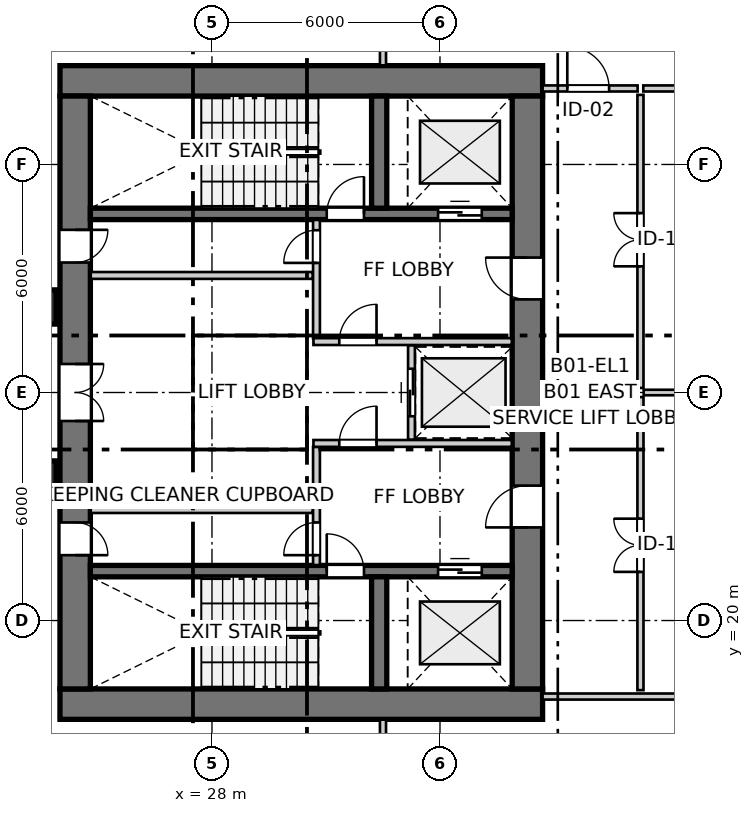
"""IFC4 building model, lengths in metres.
Left out: names, types, materials, properties, quantities, classifications, styles, units other than length and angle.
Written with IfcOpenShell. Run it as: python <this file> out.ifc"""

import sys

from ifc_helpers import new_model, si_unit, direction, frame, frame_2d, origin, origin_2d, place, context, subcontext, project, spatial, rectangle, extrude, source, transform, mapped, element, fill, save


model = new_model("IFC4")
c1 = context("Model", 3, precision=1e-05, world=origin(), true_north=direction((0.0, 1.0)))
c2 = subcontext(c1, "Body", "Model", "MODEL_VIEW")
j1 = project(units=[si_unit("LENGTHUNIT", "METRE"), si_unit("PLANEANGLEUNIT", "RADIAN")], contexts=[c1])
p1 = place(None, origin())
s1 = spatial("IfcSite", under=j1, at=p1, CompositionType="ELEMENT")
p2 = place(p1, origin())
s2 = spatial("IfcBuilding", under=s1, at=p2, CompositionType="ELEMENT")
p3 = place(p2, frame((0.0, 0.0, -4.2)))
s3 = spatial("IfcBuildingStorey", under=s2, at=p3, CompositionType="ELEMENT", Elevation=-4.2)
m1 = source(origin(), c2, "Body", "SweptSolid", [
    extrude(rectangle(XDim=0.9, YDim=0.9, at=origin_2d()), origin(), (0.0, 0.0, 1.0), 3.9),
])
for number, where, z_axis, x_axis in (
    (1, (23.45, 23.75, 0.0), (0.0, 0.0, 1.0), (1.0, 0.0, 0.0)),
    (2, (23.45, 28.25, 0.0), (0.0, 0.0, 1.0), (1.0, 0.0, 0.0)),
):
    element("IfcColumn", number, at=place(p3, frame(where, z_axis=z_axis, x_axis=x_axis)), inside=s3, PredefinedType="COLUMN", context=c2, shape_type="MappedRepresentation", body=[
        mapped(m1, transform((0.0, 0.0, 0.0), x_axis=(1.0, 0.0, 0.0), y_axis=(0.0, 1.0, 0.0), z_axis=(0.0, 0.0, 1.0), scale=1.0)),
    ])
for number, where, z_axis, x_axis in (
    (3, (24.0, 17.8, 0.0), (0.0, 0.0, 1.0), (1.0, 0.0, 0.0)),
    (4, (36.7, 34.2, 0.0), (0.0, 0.0, 1.0), (-1.0, 0.0, 0.0)),
):
    element("IfcWall", number, at=place(p3, frame(where, z_axis=z_axis, x_axis=x_axis)), inside=s3, PredefinedType="SHEAR", context=c2, shape_type="SweptSolid", body=[
        extrude(rectangle(XDim=12.7, YDim=0.8, at=frame_2d((6.35, 0.0))), origin(), (0.0, 0.0, 1.0), 3.9),
    ])
p4 = place(p3, frame((24.4, 33.8, 0.0), z_axis=(0.0, 0.0, 1.0), x_axis=(0.0, -1.0, 0.0)))
e5 = element("IfcWall", 5, at=p4, inside=s3, PredefinedType="SHEAR", context=c2, shape_type="SweptSolid", body=[
    extrude(rectangle(XDim=15.6, YDim=0.8, at=frame_2d((7.8, 0.0))), origin(), (0.0, 0.0, 1.0), 3.9),
])
p5 = place(p4, frame((7.05, 0.0, 0.0)))
e6 = element("IfcOpeningElement", 6, at=p5, cuts=e5, PredefinedType="OPENING", context=c2, shape_type="SweptSolid", body=[
    extrude(rectangle(XDim=1.5, YDim=2.15, at=frame_2d((0.75, 1.075))), frame((0.0, 0.41, 0.0), z_axis=(0.0, -1.0, 0.0), x_axis=(1.0, 0.0, 0.0)), (0.0, 0.0, 1.0), 0.82),
])
p6 = place(p4, frame((3.52, 0.0, 0.0)))
e7 = element("IfcOpeningElement", 7, at=p6, cuts=e5, PredefinedType="OPENING", context=c2, shape_type="SweptSolid", body=[
    extrude(rectangle(XDim=0.86, YDim=2.05, at=frame_2d((0.43, 1.025))), frame((0.0, 0.41, 0.0), z_axis=(0.0, -1.0, 0.0), x_axis=(1.0, 0.0, 0.0)), (0.0, 0.0, 1.0), 0.82),
])
p7 = place(p4, frame((11.22, 0.0, 0.0)))
e8 = element("IfcOpeningElement", 8, at=p7, cuts=e5, PredefinedType="OPENING", context=c2, shape_type="SweptSolid", body=[
    extrude(rectangle(XDim=0.86, YDim=2.05, at=frame_2d((0.43, 1.025))), frame((0.0, 0.41, 0.0), z_axis=(0.0, -1.0, 0.0), x_axis=(1.0, 0.0, 0.0)), (0.0, 0.0, 1.0), 0.82),
])
p8 = place(p3, frame((36.3, 18.2, 0.0), z_axis=(0.0, 0.0, 1.0), x_axis=(0.0, 1.0, 0.0)))
e9 = element("IfcWall", 9, at=p8, inside=s3, PredefinedType="SHEAR", context=c2, shape_type="SweptSolid", body=[
    extrude(rectangle(XDim=15.6, YDim=0.8, at=frame_2d((7.8, 0.0))), origin(), (0.0, 0.0, 1.0), 3.9),
])
p9 = place(p8, frame((4.25, 0.0, 0.0)))
e10 = element("IfcOpeningElement", 10, at=p9, cuts=e9, PredefinedType="OPENING", context=c2, shape_type="SweptSolid", body=[
    extrude(rectangle(XDim=1.1, YDim=2.15, at=frame_2d((0.55, 1.075))), frame((0.0, 0.41, 0.0), z_axis=(0.0, -1.0, 0.0), x_axis=(1.0, 0.0, 0.0)), (0.0, 0.0, 1.0), 0.82),
])
p10 = place(p8, frame((10.25, 0.0, 0.0)))
e11 = element("IfcOpeningElement", 11, at=p10, cuts=e9, PredefinedType="OPENING", context=c2, shape_type="SweptSolid", body=[
    extrude(rectangle(XDim=1.1, YDim=2.15, at=frame_2d((0.55, 1.075))), frame((0.0, 0.41, 0.0), z_axis=(0.0, -1.0, 0.0), x_axis=(1.0, 0.0, 0.0)), (0.0, 0.0, 1.0), 0.82),
])
p11 = place(p3, frame((24.8, 21.3, 0.0), z_axis=(0.0, 0.0, 1.0), x_axis=(1.0, 0.0, 0.0)))
e12 = element("IfcWall", 12, at=p11, inside=s3, PredefinedType="SHEAR", context=c2, shape_type="SweptSolid", body=[
    extrude(rectangle(XDim=11.1, YDim=0.3, at=frame_2d((5.55, 0.0))), origin(), (0.0, 0.0, 1.0), 3.9),
])
p12 = place(p11, frame((6.22, 0.0, 0.0)))
e13 = element("IfcOpeningElement", 13, at=p12, cuts=e12, PredefinedType="OPENING", context=c2, shape_type="SweptSolid", body=[
    extrude(rectangle(XDim=0.98, YDim=2.15, at=frame_2d((0.49, 1.075))), frame((0.0, 0.16, 0.0), z_axis=(0.0, -1.0, 0.0), x_axis=(1.0, 0.0, 0.0)), (0.0, 0.0, 1.0), 0.32),
])
p13 = place(p11, frame((9.15, 0.0, 0.0)))
e14 = element("IfcOpeningElement", 14, at=p13, cuts=e12, PredefinedType="OPENING", context=c2, shape_type="SweptSolid", body=[
    extrude(rectangle(XDim=1.15, YDim=2.15, at=frame_2d((0.575, 1.075))), frame((0.0, 0.16, 0.0), z_axis=(0.0, -1.0, 0.0), x_axis=(1.0, 0.0, 0.0)), (0.0, 0.0, 1.0), 0.32),
])
p14 = place(p3, frame((32.4, 18.2, 0.0), z_axis=(0.0, 0.0, 1.0), x_axis=(0.0, 1.0, 0.0)))
e15 = element("IfcWall", 15, at=p14, inside=s3, PredefinedType="SHEAR", context=c2, shape_type="SweptSolid", body=[
    extrude(rectangle(XDim=2.95, YDim=0.4, at=frame_2d((1.475, 0.0))), origin(), (0.0, 0.0, 1.0), 3.9),
])
p15 = place(p3, frame((24.8, 30.7, 0.0), z_axis=(0.0, 0.0, 1.0), x_axis=(1.0, 0.0, 0.0)))
e16 = element("IfcWall", 16, at=p15, inside=s3, PredefinedType="SHEAR", context=c2, shape_type="SweptSolid", body=[
    extrude(rectangle(XDim=11.1, YDim=0.3, at=frame_2d((5.55, 0.0))), origin(), (0.0, 0.0, 1.0), 3.9),
])
p16 = place(p15, frame((6.22, 0.0, 0.0)))
e17 = element("IfcOpeningElement", 17, at=p16, cuts=e16, PredefinedType="OPENING", context=c2, shape_type="SweptSolid", body=[
    extrude(rectangle(XDim=0.98, YDim=2.15, at=frame_2d((0.49, 1.075))), frame((0.0, 0.16, 0.0), z_axis=(0.0, -1.0, 0.0), x_axis=(1.0, 0.0, 0.0)), (0.0, 0.0, 1.0), 0.32),
])
p17 = place(p15, frame((9.15, 0.0, 0.0)))
e18 = element("IfcOpeningElement", 18, at=p17, cuts=e16, PredefinedType="OPENING", context=c2, shape_type="SweptSolid", body=[
    extrude(rectangle(XDim=1.15, YDim=2.15, at=frame_2d((0.575, 1.075))), frame((0.0, 0.16, 0.0), z_axis=(0.0, -1.0, 0.0), x_axis=(1.0, 0.0, 0.0)), (0.0, 0.0, 1.0), 0.32),
])
p18 = place(p3, frame((32.4, 30.85, 0.0), z_axis=(0.0, 0.0, 1.0), x_axis=(0.0, 1.0, 0.0)))
e19 = element("IfcWall", 19, at=p18, inside=s3, PredefinedType="SHEAR", context=c2, shape_type="SweptSolid", body=[
    extrude(rectangle(XDim=2.95, YDim=0.4, at=frame_2d((1.475, 0.0))), origin(), (0.0, 0.0, 1.0), 3.9),
])
p19 = place(p3, frame((30.75, 21.46, 0.0), z_axis=(0.0, 0.0, 1.0), x_axis=(0.0, 1.0, 0.0)))
e20 = element("IfcWall", 20, at=p19, inside=s3, PredefinedType="PARTITIONING", context=c2, shape_type="SweptSolid", body=[
    extrude(rectangle(XDim=3.11, YDim=0.18, at=frame_2d((1.555, 0.0))), origin(), (0.0, 0.0, 1.0), 3.9),
])
p20 = place(p19, frame((0.26, 0.0, 0.0)))
e21 = element("IfcOpeningElement", 21, at=p20, cuts=e20, PredefinedType="OPENING", context=c2, shape_type="SweptSolid", body=[
    extrude(rectangle(XDim=0.86, YDim=2.05, at=frame_2d((0.43, 1.025))), frame((0.0, 0.1, 0.0), z_axis=(0.0, -1.0, 0.0), x_axis=(1.0, 0.0, 0.0)), (0.0, 0.0, 1.0), 0.2),
])
p21 = place(p3, frame((30.67, 24.66, 0.0), z_axis=(0.0, 0.0, 1.0), x_axis=(1.0, 0.0, 0.0)))
e22 = element("IfcWall", 22, at=p21, inside=s3, PredefinedType="PARTITIONING", context=c2, shape_type="SweptSolid", body=[
    extrude(rectangle(XDim=5.22, YDim=0.18, at=frame_2d((2.61, 0.0))), origin(), (0.0, 0.0, 1.0), 3.9),
])
p22 = place(p21, frame((0.68, 0.0, 0.0)))
e23 = element("IfcOpeningElement", 23, at=p22, cuts=e22, PredefinedType="OPENING", context=c2, shape_type="SweptSolid", body=[
    extrude(rectangle(XDim=0.98, YDim=2.15, at=frame_2d((0.49, 1.075))), frame((0.0, 0.1, 0.0), z_axis=(0.0, -1.0, 0.0), x_axis=(1.0, 0.0, 0.0)), (0.0, 0.0, 1.0), 0.2),
])
p23 = place(p3, frame((30.75, 27.43, 0.0), z_axis=(0.0, 0.0, 1.0), x_axis=(0.0, 1.0, 0.0)))
e24 = element("IfcWall", 24, at=p23, inside=s3, PredefinedType="PARTITIONING", context=c2, shape_type="SweptSolid", body=[
    extrude(rectangle(XDim=3.11, YDim=0.18, at=frame_2d((1.555, 0.0))), origin(), (0.0, 0.0, 1.0), 3.9),
])
p24 = place(p23, frame((1.98, 0.0, 0.0)))
e25 = element("IfcOpeningElement", 25, at=p24, cuts=e24, PredefinedType="OPENING", context=c2, shape_type="SweptSolid", body=[
    extrude(rectangle(XDim=0.86, YDim=2.05, at=frame_2d((0.43, 1.025))), frame((0.0, 0.1, 0.0), z_axis=(0.0, -1.0, 0.0), x_axis=(1.0, 0.0, 0.0)), (0.0, 0.0, 1.0), 0.2),
])
p25 = place(p3, frame((30.67, 27.34, 0.0), z_axis=(0.0, 0.0, 1.0), x_axis=(1.0, 0.0, 0.0)))
e26 = element("IfcWall", 26, at=p25, inside=s3, PredefinedType="PARTITIONING", context=c2, shape_type="SweptSolid", body=[
    extrude(rectangle(XDim=5.22, YDim=0.18, at=frame_2d((2.61, 0.0))), origin(), (0.0, 0.0, 1.0), 3.9),
])
p26 = place(p25, frame((0.68, 0.0, 0.0)))
e27 = element("IfcOpeningElement", 27, at=p26, cuts=e26, PredefinedType="OPENING", context=c2, shape_type="SweptSolid", body=[
    extrude(rectangle(XDim=0.98, YDim=2.15, at=frame_2d((0.49, 1.075))), frame((0.0, 0.1, 0.0), z_axis=(0.0, -1.0, 0.0), x_axis=(1.0, 0.0, 0.0)), (0.0, 0.0, 1.0), 0.2),
])
p27 = place(p3, frame((33.25, 24.76, 0.0), z_axis=(0.0, 0.0, 1.0), x_axis=(0.0, 1.0, 0.0)))
e28 = element("IfcWall", 28, at=p27, inside=s3, PredefinedType="PARTITIONING", context=c2, shape_type="SweptSolid", body=[
    extrude(rectangle(XDim=2.48, YDim=0.18, at=frame_2d((1.24, 0.0))), origin(), (0.0, 0.0, 1.0), 3.9),
])
p28 = place(p27, frame((0.615, 0.0, 0.0)))
e29 = element("IfcOpeningElement", 29, at=p28, cuts=e28, PredefinedType="OPENING", context=c2, shape_type="SweptSolid", body=[
    extrude(rectangle(XDim=1.25, YDim=2.15, at=frame_2d((0.625, 1.075))), frame((0.0, 0.1, 0.0), z_axis=(0.0, -1.0, 0.0), x_axis=(1.0, 0.0, 0.0)), (0.0, 0.0, 1.0), 0.2),
])
for number, where, z_axis, x_axis in (
    (30, (24.81, 22.92, 0.0), (0.0, 0.0, 1.0), (1.0, 0.0, 0.0)),
    (31, (24.81, 29.08, 0.0), (0.0, 0.0, 1.0), (1.0, 0.0, 0.0)),
):
    element("IfcWall", number, at=place(p3, frame(where, z_axis=z_axis, x_axis=x_axis)), inside=s3, PredefinedType="PARTITIONING", context=c2, shape_type="SweptSolid", body=[
        extrude(rectangle(XDim=5.84, YDim=0.18, at=frame_2d((2.92, 0.0))), origin(), (0.0, 0.0, 1.0), 3.9),
    ])
for number, where, z_axis, x_axis in (
    (32, (32.5, 15.588, 0.0), (0.0, 0.0, 1.0), (0.0, 1.0, 0.0)),
    (33, (32.5, 34.608, 0.0), (0.0, 0.0, 1.0), (0.0, 1.0, 0.0)),
):
    element("IfcWall", number, at=place(p3, frame(where, z_axis=z_axis, x_axis=x_axis)), inside=s3, PredefinedType="PARTITIONING", context=c2, shape_type="SweptSolid", body=[
        extrude(rectangle(XDim=1.804, YDim=0.16, at=frame_2d((0.902, 0.0))), origin(), (0.0, 0.0, 1.0), 3.9),
    ])
p29 = place(p3, frame((36.7, 18.0, 0.0), z_axis=(0.0, 0.0, 1.0), x_axis=(1.0, 0.0, 0.0)))
e34 = element("IfcWall", 34, at=p29, inside=s3, PredefinedType="PARTITIONING", context=c2, shape_type="SweptSolid", body=[
    extrude(rectangle(XDim=9.7, YDim=0.16, at=frame_2d((4.85, 0.0))), origin(), (0.0, 0.0, 1.0), 3.9),
])
p30 = place(p3, frame((36.7, 34.0, 0.0), z_axis=(0.0, 0.0, 1.0), x_axis=(1.0, 0.0, 0.0)))
e35 = element("IfcWall", 35, at=p30, inside=s3, PredefinedType="PARTITIONING", context=c2, shape_type="SweptSolid", body=[
    extrude(rectangle(XDim=2.5, YDim=0.16, at=frame_2d((1.25, 0.0))), origin(), (0.0, 0.0, 1.0), 3.9),
])
p31 = place(p30, frame((0.65, 0.0, 0.0)))
e36 = element("IfcOpeningElement", 36, at=p31, cuts=e35, PredefinedType="OPENING", context=c2, shape_type="SweptSolid", body=[
    extrude(rectangle(XDim=1.1, YDim=2.15, at=frame_2d((0.55, 1.075))), frame((0.0, 0.09, 0.0), z_axis=(0.0, -1.0, 0.0), x_axis=(1.0, 0.0, 0.0)), (0.0, 0.0, 1.0), 0.18),
])
p32 = place(p3, frame((39.35, 34.0, 0.0), z_axis=(0.0, 0.0, 1.0), x_axis=(1.0, 0.0, 0.0)))
e37 = element("IfcWall", 37, at=p32, inside=s3, PredefinedType="PARTITIONING", context=c2, shape_type="SweptSolid", body=[
    extrude(rectangle(XDim=7.05, YDim=0.16, at=frame_2d((3.525, 0.0))), origin(), (0.0, 0.0, 1.0), 3.9),
])
p33 = place(p3, frame((39.275, 18.168, 0.0), z_axis=(0.0, 0.0, 1.0), x_axis=(0.0, 1.0, 0.0)))
e38 = element("IfcWall", 38, at=p33, inside=s3, PredefinedType="PARTITIONING", context=c2, shape_type="SweptSolid", body=[
    extrude(rectangle(XDim=7.712, YDim=0.16, at=frame_2d((3.856, 0.0))), origin(), (0.0, 0.0, 1.0), 3.9),
])
p34 = place(p33, frame((3.112, 0.0, 0.0)))
e39 = element("IfcOpeningElement", 39, at=p34, cuts=e38, PredefinedType="OPENING", context=c2, shape_type="SweptSolid", body=[
    extrude(rectangle(XDim=1.4, YDim=2.15, at=frame_2d((0.7, 1.075))), frame((0.0, 0.09, 0.0), z_axis=(0.0, -1.0, 0.0), x_axis=(1.0, 0.0, 0.0)), (0.0, 0.0, 1.0), 0.18),
])
p35 = place(p3, frame((39.275, 26.12, 0.0), z_axis=(0.0, 0.0, 1.0), x_axis=(0.0, 1.0, 0.0)))
e40 = element("IfcWall", 40, at=p35, inside=s3, PredefinedType="PARTITIONING", context=c2, shape_type="SweptSolid", body=[
    extrude(rectangle(XDim=7.712, YDim=0.16, at=frame_2d((3.856, 0.0))), origin(), (0.0, 0.0, 1.0), 3.9),
])
p36 = place(p35, frame((3.2, 0.0, 0.0)))
e41 = element("IfcOpeningElement", 41, at=p36, cuts=e40, PredefinedType="OPENING", context=c2, shape_type="SweptSolid", body=[
    extrude(rectangle(XDim=1.4, YDim=2.15, at=frame_2d((0.7, 1.075))), frame((0.0, 0.09, 0.0), z_axis=(0.0, -1.0, 0.0), x_axis=(1.0, 0.0, 0.0)), (0.0, 0.0, 1.0), 0.18),
])
p37 = place(p3, frame((39.36, 26.0, 0.0), z_axis=(0.0, 0.0, 1.0), x_axis=(1.0, 0.0, 0.0)))
e42 = element("IfcWall", 42, at=p37, inside=s3, PredefinedType="PARTITIONING", context=c2, shape_type="SweptSolid", body=[
    extrude(rectangle(XDim=6.96, YDim=0.145, at=frame_2d((3.48, 0.0))), origin(), (0.0, 0.0, 1.0), 3.9),
])
m2 = source(origin(), c2, "Body", "SweptSolid", [
    extrude(rectangle(XDim=0.98, YDim=2.15, at=frame_2d((0.49, 1.075))), frame((0.0, 0.025, 0.0), z_axis=(0.0, -1.0, 0.0), x_axis=(1.0, 0.0, 0.0)), (0.0, 0.0, 1.0), 0.05),
])
p38 = place(p12, origin())
e43 = element("IfcDoor", 43, at=p38, inside=s3, OperationType="SINGLE_SWING_LEFT", PredefinedType="DOOR", context=c2, shape_type="MappedRepresentation", body=[
    mapped(m2, transform((0.0, 0.0, 0.0), x_axis=(1.0, 0.0, 0.0), y_axis=(0.0, 1.0, 0.0), z_axis=(0.0, 0.0, 1.0), scale=1.0)),
])
fill(e13, e43)
m3 = source(origin(), c2, "Body", "SweptSolid", [
    extrude(rectangle(XDim=1.15, YDim=2.15, at=frame_2d((0.575, 1.075))), frame((0.0, 0.025, 0.0), z_axis=(0.0, -1.0, 0.0), x_axis=(1.0, 0.0, 0.0)), (0.0, 0.0, 1.0), 0.05),
])
p39 = place(p13, origin())
e44 = element("IfcDoor", 44, at=p39, inside=s3, OperationType="DOUBLE_DOOR_SLIDING", PredefinedType="DOOR", context=c2, shape_type="MappedRepresentation", body=[
    mapped(m3, transform((0.0, 0.0, 0.0), x_axis=(1.0, 0.0, 0.0), y_axis=(0.0, 1.0, 0.0), z_axis=(0.0, 0.0, 1.0), scale=1.0)),
])
fill(e14, e44)
p40 = place(p16, origin())
e45 = element("IfcDoor", 45, at=p40, inside=s3, OperationType="SINGLE_SWING_RIGHT", PredefinedType="DOOR", context=c2, shape_type="MappedRepresentation", body=[
    mapped(m2, transform((0.0, 0.0, 0.0), x_axis=(1.0, 0.0, 0.0), y_axis=(0.0, 1.0, 0.0), z_axis=(0.0, 0.0, 1.0), scale=1.0)),
])
fill(e17, e45)
p41 = place(p17, origin())
e46 = element("IfcDoor", 46, at=p41, inside=s3, OperationType="DOUBLE_DOOR_SLIDING", PredefinedType="DOOR", context=c2, shape_type="MappedRepresentation", body=[
    mapped(m3, transform((0.0, 0.0, 0.0), x_axis=(1.0, 0.0, 0.0), y_axis=(0.0, 1.0, 0.0), z_axis=(0.0, 0.0, 1.0), scale=1.0)),
])
fill(e18, e46)
m4 = source(origin(), c2, "Body", "SweptSolid", [
    extrude(rectangle(XDim=1.1, YDim=2.15, at=frame_2d((0.55, 1.075))), frame((0.0, 0.025, 0.0), z_axis=(0.0, -1.0, 0.0), x_axis=(1.0, 0.0, 0.0)), (0.0, 0.0, 1.0), 0.05),
])
p42 = place(p9, origin())
e47 = element("IfcDoor", 47, at=p42, inside=s3, OperationType="SINGLE_SWING_LEFT", PredefinedType="DOOR", context=c2, shape_type="MappedRepresentation", body=[
    mapped(m4, transform((0.0, 0.0, 0.0), x_axis=(1.0, 0.0, 0.0), y_axis=(0.0, 1.0, 0.0), z_axis=(0.0, 0.0, 1.0), scale=1.0)),
])
fill(e10, e47)
p43 = place(p10, origin())
e48 = element("IfcDoor", 48, at=p43, inside=s3, OperationType="SINGLE_SWING_RIGHT", PredefinedType="DOOR", context=c2, shape_type="MappedRepresentation", body=[
    mapped(m4, transform((0.0, 0.0, 0.0), x_axis=(1.0, 0.0, 0.0), y_axis=(0.0, 1.0, 0.0), z_axis=(0.0, 0.0, 1.0), scale=1.0)),
])
fill(e11, e48)
m5 = source(origin(), c2, "Body", "SweptSolid", [
    extrude(rectangle(XDim=1.5, YDim=2.15, at=frame_2d((0.75, 1.075))), frame((0.0, 0.025, 0.0), z_axis=(0.0, -1.0, 0.0), x_axis=(1.0, 0.0, 0.0)), (0.0, 0.0, 1.0), 0.05),
])
p44 = place(p5, origin())
e49 = element("IfcDoor", 49, at=p44, inside=s3, OperationType="DOUBLE_DOOR_SINGLE_SWING", PredefinedType="DOOR", context=c2, shape_type="MappedRepresentation", body=[
    mapped(m5, transform((0.0, 0.0, 0.0), x_axis=(1.0, 0.0, 0.0), y_axis=(0.0, 1.0, 0.0), z_axis=(0.0, 0.0, 1.0), scale=1.0)),
])
fill(e6, e49)
m6 = source(origin(), c2, "Body", "SweptSolid", [
    extrude(rectangle(XDim=0.86, YDim=2.05, at=frame_2d((0.43, 1.025))), frame((0.0, 0.025, 0.0), z_axis=(0.0, -1.0, 0.0), x_axis=(1.0, 0.0, 0.0)), (0.0, 0.0, 1.0), 0.05),
])
p45 = place(p6, origin())
e50 = element("IfcDoor", 50, at=p45, inside=s3, OperationType="SINGLE_SWING_LEFT", PredefinedType="DOOR", context=c2, shape_type="MappedRepresentation", body=[
    mapped(m6, transform((0.0, 0.0, 0.0), x_axis=(1.0, 0.0, 0.0), y_axis=(0.0, 1.0, 0.0), z_axis=(0.0, 0.0, 1.0), scale=1.0)),
])
fill(e7, e50)
p46 = place(p7, origin())
e51 = element("IfcDoor", 51, at=p46, inside=s3, OperationType="SINGLE_SWING_RIGHT", PredefinedType="DOOR", context=c2, shape_type="MappedRepresentation", body=[
    mapped(m6, transform((0.0, 0.0, 0.0), x_axis=(1.0, 0.0, 0.0), y_axis=(0.0, 1.0, 0.0), z_axis=(0.0, 0.0, 1.0), scale=1.0)),
])
fill(e8, e51)
p47 = place(p20, origin())
e52 = element("IfcDoor", 52, at=p47, inside=s3, OperationType="SINGLE_SWING_LEFT", PredefinedType="DOOR", context=c2, shape_type="MappedRepresentation", body=[
    mapped(m6, transform((0.0, 0.0, 0.0), x_axis=(1.0, 0.0, 0.0), y_axis=(0.0, 1.0, 0.0), z_axis=(0.0, 0.0, 1.0), scale=1.0)),
])
fill(e21, e52)
p48 = place(p22, origin())
e53 = element("IfcDoor", 53, at=p48, inside=s3, OperationType="SINGLE_SWING_RIGHT", PredefinedType="DOOR", context=c2, shape_type="MappedRepresentation", body=[
    mapped(m2, transform((0.0, 0.0, 0.0), x_axis=(1.0, 0.0, 0.0), y_axis=(0.0, 1.0, 0.0), z_axis=(0.0, 0.0, 1.0), scale=1.0)),
])
fill(e23, e53)
p49 = place(p24, origin())
e54 = element("IfcDoor", 54, at=p49, inside=s3, OperationType="SINGLE_SWING_LEFT", PredefinedType="DOOR", context=c2, shape_type="MappedRepresentation", body=[
    mapped(m6, transform((0.0, 0.0, 0.0), x_axis=(1.0, 0.0, 0.0), y_axis=(0.0, 1.0, 0.0), z_axis=(0.0, 0.0, 1.0), scale=1.0)),
])
fill(e25, e54)
p50 = place(p26, origin())
e55 = element("IfcDoor", 55, at=p50, inside=s3, OperationType="SINGLE_SWING_RIGHT", PredefinedType="DOOR", context=c2, shape_type="MappedRepresentation", body=[
    mapped(m2, transform((0.0, 0.0, 0.0), x_axis=(1.0, 0.0, 0.0), y_axis=(0.0, 1.0, 0.0), z_axis=(0.0, 0.0, 1.0), scale=1.0)),
])
fill(e27, e55)
m7 = source(origin(), c2, "Body", "SweptSolid", [
    extrude(rectangle(XDim=1.25, YDim=2.15, at=frame_2d((0.625, 1.075))), frame((0.0, 0.025, 0.0), z_axis=(0.0, -1.0, 0.0), x_axis=(1.0, 0.0, 0.0)), (0.0, 0.0, 1.0), 0.05),
])
p51 = place(p28, origin())
e56 = element("IfcDoor", 56, at=p51, inside=s3, OperationType="DOUBLE_DOOR_SLIDING", PredefinedType="DOOR", context=c2, shape_type="MappedRepresentation", body=[
    mapped(m7, transform((0.0, 0.0, 0.0), x_axis=(1.0, 0.0, 0.0), y_axis=(0.0, 1.0, 0.0), z_axis=(0.0, 0.0, 1.0), scale=1.0)),
])
fill(e29, e56)
p52 = place(p31, origin())
e57 = element("IfcDoor", 57, at=p52, inside=s3, OperationType="SINGLE_SWING_LEFT", PredefinedType="DOOR", context=c2, shape_type="MappedRepresentation", body=[
    mapped(m4, transform((0.0, 0.0, 0.0), x_axis=(1.0, 0.0, 0.0), y_axis=(0.0, 1.0, 0.0), z_axis=(0.0, 0.0, 1.0), scale=1.0)),
])
fill(e36, e57)
m8 = source(origin(), c2, "Body", "SweptSolid", [
    extrude(rectangle(XDim=1.4, YDim=2.15, at=frame_2d((0.7, 1.075))), frame((0.0, 0.025, 0.0), z_axis=(0.0, -1.0, 0.0), x_axis=(1.0, 0.0, 0.0)), (0.0, 0.0, 1.0), 0.05),
])
p53 = place(p34, origin())
e58 = element("IfcDoor", 58, at=p53, inside=s3, OperationType="DOUBLE_DOOR_SINGLE_SWING", PredefinedType="DOOR", context=c2, shape_type="MappedRepresentation", body=[
    mapped(m8, transform((0.0, 0.0, 0.0), x_axis=(1.0, 0.0, 0.0), y_axis=(0.0, 1.0, 0.0), z_axis=(0.0, 0.0, 1.0), scale=1.0)),
])
fill(e39, e58)
p54 = place(p36, origin())
e59 = element("IfcDoor", 59, at=p54, inside=s3, OperationType="DOUBLE_DOOR_SINGLE_SWING", PredefinedType="DOOR", context=c2, shape_type="MappedRepresentation", body=[
    mapped(m8, transform((0.0, 0.0, 0.0), x_axis=(1.0, 0.0, 0.0), y_axis=(0.0, 1.0, 0.0), z_axis=(0.0, 0.0, 1.0), scale=1.0)),
])
fill(e41, e59)
save(model, sys.argv[1])
